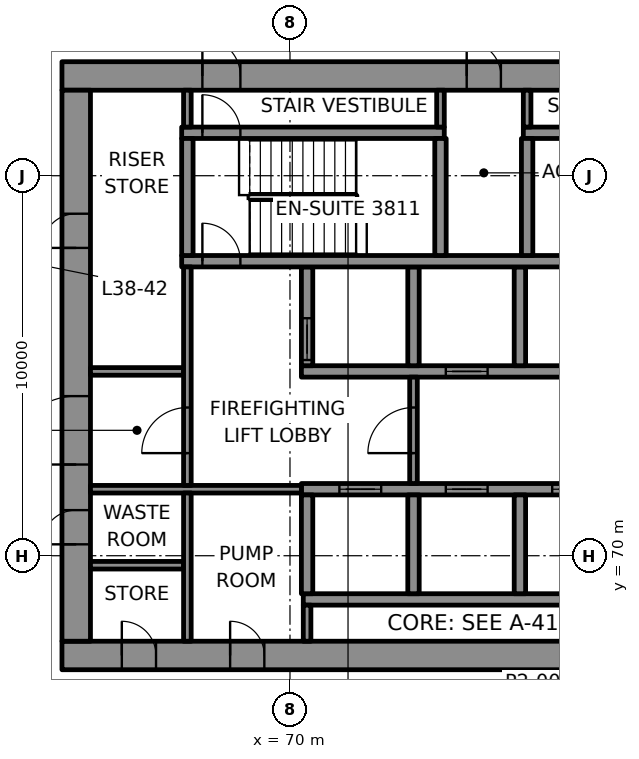
"""IFC4 building model, lengths in metres.
Left out: names, types, materials, properties, quantities, classifications, styles, units other than length and angle.
Written with IfcOpenShell. Run it as: python <this file> out.ifc"""

import sys

from ifc_helpers import new_model, si_unit, direction, frame, frame_2d, origin, place, context, subcontext, project, spatial, rectangle, extrude, element, fill, save


model = new_model("IFC4")
c1 = context("Model", 3, precision=1e-05, world=origin(), true_north=direction((0.0, 1.0)))
c2 = subcontext(c1, "Body", "Model", "MODEL_VIEW")
j1 = project(units=[si_unit("LENGTHUNIT", "METRE"), si_unit("PLANEANGLEUNIT", "RADIAN")], contexts=[c1])
p1 = place(None, origin())
s1 = spatial("IfcSite", under=j1, at=p1, CompositionType="ELEMENT")
p2 = place(p1, origin())
s2 = spatial("IfcBuilding", under=s1, at=p2, CompositionType="ELEMENT")
p3 = place(p2, frame((0.0, 0.0, 167.5)))
s3 = spatial("IfcBuildingStorey", under=s2, at=p3, CompositionType="ELEMENT", Elevation=167.5)
p4 = place(p3, frame((64.0, 67.375, 0.0), z_axis=(0.0, 0.0, 1.0), x_axis=(1.0, 0.0, 0.0)))
e1 = element("IfcWall", 1, at=p4, inside=s3, PredefinedType="SHEAR", context=c2, shape_type="SweptSolid", body=[
    extrude(rectangle(XDim=22.0, YDim=0.75, at=frame_2d((11.0, 0.0))), origin(), (0.0, 0.0, 1.0), 3.7),
])
p5 = place(p4, frame((1.575, 0.0, 0.0)))
e2 = element("IfcOpeningElement", 2, at=p5, cuts=e1, PredefinedType="OPENING", context=c2, shape_type="SweptSolid", body=[
    extrude(rectangle(XDim=0.9, YDim=2.1, at=frame_2d((0.45, 1.05))), frame((0.0, 0.385, 0.0), z_axis=(0.0, -1.0, 0.0), x_axis=(1.0, 0.0, 0.0)), (0.0, 0.0, 1.0), 0.77),
])
p6 = place(p4, frame((4.425, 0.0, 0.0)))
e3 = element("IfcOpeningElement", 3, at=p6, cuts=e1, PredefinedType="OPENING", context=c2, shape_type="SweptSolid", body=[
    extrude(rectangle(XDim=0.9, YDim=2.1, at=frame_2d((0.45, 1.05))), frame((0.0, 0.385, 0.0), z_axis=(0.0, -1.0, 0.0), x_axis=(1.0, 0.0, 0.0)), (0.0, 0.0, 1.0), 0.77),
])
p7 = place(p3, frame((64.0, 82.625, 0.0), z_axis=(0.0, 0.0, 1.0), x_axis=(1.0, 0.0, 0.0)))
e4 = element("IfcWall", 4, at=p7, inside=s3, PredefinedType="SHEAR", context=c2, shape_type="SweptSolid", body=[
    extrude(rectangle(XDim=22.0, YDim=0.75, at=frame_2d((11.0, 0.0))), origin(), (0.0, 0.0, 1.0), 3.7),
])
p8 = place(p7, frame((3.695, 0.0, 0.0)))
e5 = element("IfcOpeningElement", 5, at=p8, cuts=e4, PredefinedType="OPENING", context=c2, shape_type="SweptSolid", body=[
    extrude(rectangle(XDim=1.0, YDim=2.1, at=frame_2d((0.5, 1.05))), frame((0.0, 0.385, 0.0), z_axis=(0.0, -1.0, 0.0), x_axis=(1.0, 0.0, 0.0)), (0.0, 0.0, 1.0), 0.77),
])
p9 = place(p7, frame((17.505, 0.0, 0.0)))
e6 = element("IfcOpeningElement", 6, at=p9, cuts=e4, PredefinedType="OPENING", context=c2, shape_type="SweptSolid", body=[
    extrude(rectangle(XDim=1.0, YDim=2.1, at=frame_2d((0.5, 1.05))), frame((0.0, 0.385, 0.0), z_axis=(0.0, -1.0, 0.0), x_axis=(1.0, 0.0, 0.0)), (0.0, 0.0, 1.0), 0.77),
])
p10 = place(p7, frame((10.65, 0.0, 0.0)))
e7 = element("IfcOpeningElement", 7, at=p10, cuts=e4, PredefinedType="OPENING", context=c2, shape_type="SweptSolid", body=[
    extrude(rectangle(XDim=0.9, YDim=2.1, at=frame_2d((0.45, 1.05))), frame((0.0, 0.385, 0.0), z_axis=(0.0, -1.0, 0.0), x_axis=(1.0, 0.0, 0.0)), (0.0, 0.0, 1.0), 0.77),
])
p11 = place(p3, frame((64.375, 67.75, 0.0), z_axis=(0.0, 0.0, 1.0), x_axis=(0.0, 1.0, 0.0)))
e8 = element("IfcWall", 8, at=p11, inside=s3, PredefinedType="SHEAR", context=c2, shape_type="SweptSolid", body=[
    extrude(rectangle(XDim=14.5, YDim=0.75, at=frame_2d((7.25, 0.0))), origin(), (0.0, 0.0, 1.0), 3.7),
])
p12 = place(p11, frame((4.65, 0.0, 0.0)))
e9 = element("IfcOpeningElement", 9, at=p12, cuts=e8, PredefinedType="OPENING", context=c2, shape_type="SweptSolid", body=[
    extrude(rectangle(XDim=1.8, YDim=2.1, at=frame_2d((0.9, 1.05))), frame((0.0, 0.385, 0.0), z_axis=(0.0, -1.0, 0.0), x_axis=(1.0, 0.0, 0.0)), (0.0, 0.0, 1.0), 0.77),
])
p13 = place(p11, frame((2.55, 0.0, 0.0)))
e10 = element("IfcOpeningElement", 10, at=p13, cuts=e8, PredefinedType="OPENING", context=c2, shape_type="SweptSolid", body=[
    extrude(rectangle(XDim=0.9, YDim=2.1, at=frame_2d((0.45, 1.05))), frame((0.0, 0.385, 0.0), z_axis=(0.0, -1.0, 0.0), x_axis=(1.0, 0.0, 0.0)), (0.0, 0.0, 1.0), 0.77),
])
p14 = place(p11, frame((10.35, 0.0, 0.0)))
e11 = element("IfcOpeningElement", 11, at=p14, cuts=e8, PredefinedType="OPENING", context=c2, shape_type="SweptSolid", body=[
    extrude(rectangle(XDim=0.9, YDim=2.1, at=frame_2d((0.45, 1.05))), frame((0.0, 0.385, 0.0), z_axis=(0.0, -1.0, 0.0), x_axis=(1.0, 0.0, 0.0)), (0.0, 0.0, 1.0), 0.77),
])
p15 = place(p3, frame((70.35, 68.85, 0.0), z_axis=(0.0, 0.0, 1.0), x_axis=(1.0, 0.0, 0.0)))
e12 = element("IfcWall", 12, at=p15, inside=s3, PredefinedType="SHEAR", context=c2, shape_type="SweptSolid", body=[
    extrude(rectangle(XDim=14.2, YDim=0.3, at=frame_2d((7.1, 0.0))), origin(), (0.0, 0.0, 1.0), 3.7),
])
p16 = place(p3, frame((70.3, 71.75, 0.0), z_axis=(0.0, 0.0, 1.0), x_axis=(1.0, 0.0, 0.0)))
e13 = element("IfcWall", 13, at=p16, inside=s3, PredefinedType="SHEAR", context=c2, shape_type="SweptSolid", body=[
    extrude(rectangle(XDim=14.3, YDim=0.3, at=frame_2d((7.15, 0.0))), origin(), (0.0, 0.0, 1.0), 3.7),
])
p17 = place(p16, frame((1.0, 0.0, 0.0)))
e14 = element("IfcOpeningElement", 14, at=p17, cuts=e13, PredefinedType="OPENING", context=c2, shape_type="SweptSolid", body=[
    extrude(rectangle(XDim=1.1, YDim=2.1, at=frame_2d((0.55, 1.05))), frame((0.0, 0.16, 0.0), z_axis=(0.0, -1.0, 0.0), x_axis=(1.0, 0.0, 0.0)), (0.0, 0.0, 1.0), 0.32),
])
p18 = place(p16, frame((3.8, 0.0, 0.0)))
e15 = element("IfcOpeningElement", 15, at=p18, cuts=e13, PredefinedType="OPENING", context=c2, shape_type="SweptSolid", body=[
    extrude(rectangle(XDim=1.1, YDim=2.1, at=frame_2d((0.55, 1.05))), frame((0.0, 0.16, 0.0), z_axis=(0.0, -1.0, 0.0), x_axis=(1.0, 0.0, 0.0)), (0.0, 0.0, 1.0), 0.32),
])
p19 = place(p16, frame((6.6, 0.0, 0.0)))
e16 = element("IfcOpeningElement", 16, at=p19, cuts=e13, PredefinedType="OPENING", context=c2, shape_type="SweptSolid", body=[
    extrude(rectangle(XDim=1.1, YDim=2.1, at=frame_2d((0.55, 1.05))), frame((0.0, 0.16, 0.0), z_axis=(0.0, -1.0, 0.0), x_axis=(1.0, 0.0, 0.0)), (0.0, 0.0, 1.0), 0.32),
])
p20 = place(p16, frame((9.4, 0.0, 0.0)))
e17 = element("IfcOpeningElement", 17, at=p20, cuts=e13, PredefinedType="OPENING", context=c2, shape_type="SweptSolid", body=[
    extrude(rectangle(XDim=1.1, YDim=2.1, at=frame_2d((0.55, 1.05))), frame((0.0, 0.16, 0.0), z_axis=(0.0, -1.0, 0.0), x_axis=(1.0, 0.0, 0.0)), (0.0, 0.0, 1.0), 0.32),
])
p21 = place(p16, frame((12.2, 0.0, 0.0)))
e18 = element("IfcOpeningElement", 18, at=p21, cuts=e13, PredefinedType="OPENING", context=c2, shape_type="SweptSolid", body=[
    extrude(rectangle(XDim=1.1, YDim=2.1, at=frame_2d((0.55, 1.05))), frame((0.0, 0.16, 0.0), z_axis=(0.0, -1.0, 0.0), x_axis=(1.0, 0.0, 0.0)), (0.0, 0.0, 1.0), 0.32),
])
p22 = place(p3, frame((70.3, 74.85, 0.0), z_axis=(0.0, 0.0, 1.0), x_axis=(1.0, 0.0, 0.0)))
e19 = element("IfcWall", 19, at=p22, inside=s3, PredefinedType="SHEAR", context=c2, shape_type="SweptSolid", body=[
    extrude(rectangle(XDim=14.3, YDim=0.3, at=frame_2d((7.15, 0.0))), origin(), (0.0, 0.0, 1.0), 3.7),
])
p23 = place(p22, frame((3.8, 0.0, 0.0)))
e20 = element("IfcOpeningElement", 20, at=p23, cuts=e19, PredefinedType="OPENING", context=c2, shape_type="SweptSolid", body=[
    extrude(rectangle(XDim=1.1, YDim=2.1, at=frame_2d((0.55, 1.05))), frame((0.0, 0.16, 0.0), z_axis=(0.0, -1.0, 0.0), x_axis=(1.0, 0.0, 0.0)), (0.0, 0.0, 1.0), 0.32),
])
p24 = place(p22, frame((12.2, 0.0, 0.0)))
e21 = element("IfcOpeningElement", 21, at=p24, cuts=e19, PredefinedType="OPENING", context=c2, shape_type="SweptSolid", body=[
    extrude(rectangle(XDim=1.1, YDim=2.1, at=frame_2d((0.55, 1.05))), frame((0.0, 0.16, 0.0), z_axis=(0.0, -1.0, 0.0), x_axis=(1.0, 0.0, 0.0)), (0.0, 0.0, 1.0), 0.32),
])
p25 = place(p3, frame((70.45, 69.0, 0.0), z_axis=(0.0, 0.0, 1.0), x_axis=(0.0, 1.0, 0.0)))
e22 = element("IfcWall", 22, at=p25, inside=s3, PredefinedType="SHEAR", context=c2, shape_type="SweptSolid", body=[
    extrude(rectangle(XDim=2.6, YDim=0.3, at=frame_2d((1.3, 0.0))), origin(), (0.0, 0.0, 1.0), 3.7),
])
p26 = place(p3, frame((70.45, 75.0, 0.0), z_axis=(0.0, 0.0, 1.0), x_axis=(0.0, 1.0, 0.0)))
e23 = element("IfcWall", 23, at=p26, inside=s3, PredefinedType="SHEAR", context=c2, shape_type="SweptSolid", body=[
    extrude(rectangle(XDim=2.6, YDim=0.3, at=frame_2d((1.3, 0.0))), origin(), (0.0, 0.0, 1.0), 3.7),
])
p27 = place(p26, frame((0.15, 0.0, 0.0)))
e24 = element("IfcOpeningElement", 24, at=p27, cuts=e23, PredefinedType="OPENING", context=c2, shape_type="SweptSolid", body=[
    extrude(rectangle(XDim=1.1, YDim=2.1, at=frame_2d((0.55, 1.05))), frame((0.0, 0.16, 0.0), z_axis=(0.0, -1.0, 0.0), x_axis=(1.0, 0.0, 0.0)), (0.0, 0.0, 1.0), 0.32),
])
for number, where, z_axis, x_axis in (
    (25, (73.25, 69.0, 0.0), (0.0, 0.0, 1.0), (0.0, 1.0, 0.0)),
    (26, (73.25, 75.0, 0.0), (0.0, 0.0, 1.0), (0.0, 1.0, 0.0)),
    (27, (76.05, 69.0, 0.0), (0.0, 0.0, 1.0), (0.0, 1.0, 0.0)),
    (28, (76.05, 75.0, 0.0), (0.0, 0.0, 1.0), (0.0, 1.0, 0.0)),
):
    element("IfcWall", number, at=place(p3, frame(where, z_axis=z_axis, x_axis=x_axis)), inside=s3, PredefinedType="SHEAR", context=c2, shape_type="SweptSolid", body=[
        extrude(rectangle(XDim=2.6, YDim=0.3, at=frame_2d((1.3, 0.0))), origin(), (0.0, 0.0, 1.0), 3.7),
    ])
p28 = place(p3, frame((67.15, 77.75, 0.0), z_axis=(0.0, 0.0, 1.0), x_axis=(1.0, 0.0, 0.0)))
e29 = element("IfcWall", 29, at=p28, inside=s3, PredefinedType="SHEAR", context=c2, shape_type="SweptSolid", body=[
    extrude(rectangle(XDim=17.45, YDim=0.3, at=frame_2d((8.725, 0.0))), origin(), (0.0, 0.0, 1.0), 3.7),
])
p29 = place(p28, frame((0.545, 0.0, 0.0)))
e30 = element("IfcOpeningElement", 30, at=p29, cuts=e29, PredefinedType="OPENING", context=c2, shape_type="SweptSolid", body=[
    extrude(rectangle(XDim=1.0, YDim=2.1, at=frame_2d((0.5, 1.05))), frame((0.0, 0.16, 0.0), z_axis=(0.0, -1.0, 0.0), x_axis=(1.0, 0.0, 0.0)), (0.0, 0.0, 1.0), 0.32),
])
p30 = place(p3, frame((67.15, 81.13, 0.0), z_axis=(0.0, 0.0, 1.0), x_axis=(1.0, 0.0, 0.0)))
e31 = element("IfcWall", 31, at=p30, inside=s3, PredefinedType="SHEAR", context=c2, shape_type="SweptSolid", body=[
    extrude(rectangle(XDim=6.91, YDim=0.3, at=frame_2d((3.455, 0.0))), origin(), (0.0, 0.0, 1.0), 3.7),
])
p31 = place(p30, frame((0.545, 0.0, 0.0)))
e32 = element("IfcOpeningElement", 32, at=p31, cuts=e31, PredefinedType="OPENING", context=c2, shape_type="SweptSolid", body=[
    extrude(rectangle(XDim=1.0, YDim=2.1, at=frame_2d((0.5, 1.05))), frame((0.0, 0.16, 0.0), z_axis=(0.0, -1.0, 0.0), x_axis=(1.0, 0.0, 0.0)), (0.0, 0.0, 1.0), 0.32),
])
p32 = place(p3, frame((76.14, 81.13, 0.0), z_axis=(0.0, 0.0, 1.0), x_axis=(1.0, 0.0, 0.0)))
e33 = element("IfcWall", 33, at=p32, inside=s3, PredefinedType="SHEAR", context=c2, shape_type="SweptSolid", body=[
    extrude(rectangle(XDim=6.86, YDim=0.3, at=frame_2d((3.43, 0.0))), origin(), (0.0, 0.0, 1.0), 3.7),
])
p33 = place(p32, frame((5.365, 0.0, 0.0)))
e34 = element("IfcOpeningElement", 34, at=p33, cuts=e33, PredefinedType="OPENING", context=c2, shape_type="SweptSolid", body=[
    extrude(rectangle(XDim=1.0, YDim=2.1, at=frame_2d((0.5, 1.05))), frame((0.0, 0.16, 0.0), z_axis=(0.0, -1.0, 0.0), x_axis=(1.0, 0.0, 0.0)), (0.0, 0.0, 1.0), 0.32),
])
for number, where, z_axis, x_axis in (
    (35, (67.3, 77.9, 0.0), (0.0, 0.0, 1.0), (0.0, 1.0, 0.0)),
    (36, (73.96, 77.9, 0.0), (0.0, 0.0, 1.0), (0.0, 1.0, 0.0)),
    (37, (76.24, 77.9, 0.0), (0.0, 0.0, 1.0), (0.0, 1.0, 0.0)),
):
    element("IfcWall", number, at=place(p3, frame(where, z_axis=z_axis, x_axis=x_axis)), inside=s3, PredefinedType="SHEAR", context=c2, shape_type="SweptSolid", body=[
        extrude(rectangle(XDim=3.08, YDim=0.3, at=frame_2d((1.54, 0.0))), origin(), (0.0, 0.0, 1.0), 3.7),
    ])
p34 = place(p3, frame((64.75, 69.75, 0.0), z_axis=(0.0, 0.0, 1.0), x_axis=(1.0, 0.0, 0.0)))
e38 = element("IfcWall", 38, at=p34, inside=s3, PredefinedType="PARTITIONING", context=c2, shape_type="SweptSolid", body=[
    extrude(rectangle(XDim=2.45, YDim=0.2, at=frame_2d((1.225, 0.0))), origin(), (0.0, 0.0, 1.0), 3.7),
])
p35 = place(p3, frame((64.75, 71.75, 0.0), z_axis=(0.0, 0.0, 1.0), x_axis=(1.0, 0.0, 0.0)))
e39 = element("IfcWall", 39, at=p35, inside=s3, PredefinedType="PARTITIONING", context=c2, shape_type="SweptSolid", body=[
    extrude(rectangle(XDim=5.55, YDim=0.2, at=frame_2d((2.775, 0.0))), origin(), (0.0, 0.0, 1.0), 3.7),
])
p36 = place(p3, frame((64.75, 74.85, 0.0), z_axis=(0.0, 0.0, 1.0), x_axis=(1.0, 0.0, 0.0)))
e40 = element("IfcWall", 40, at=p36, inside=s3, PredefinedType="PARTITIONING", context=c2, shape_type="SweptSolid", body=[
    extrude(rectangle(XDim=2.45, YDim=0.2, at=frame_2d((1.225, 0.0))), origin(), (0.0, 0.0, 1.0), 3.7),
])
p37 = place(p3, frame((67.3, 67.75, 0.0), z_axis=(0.0, 0.0, 1.0), x_axis=(0.0, 1.0, 0.0)))
e41 = element("IfcWall", 41, at=p37, inside=s3, PredefinedType="PARTITIONING", context=c2, shape_type="SweptSolid", body=[
    extrude(rectangle(XDim=3.9, YDim=0.2, at=frame_2d((1.95, 0.0))), origin(), (0.0, 0.0, 1.0), 3.7),
])
p38 = place(p3, frame((67.3, 71.85, 0.0), z_axis=(0.0, 0.0, 1.0), x_axis=(0.0, 1.0, 0.0)))
e42 = element("IfcWall", 42, at=p38, inside=s3, PredefinedType="PARTITIONING", context=c2, shape_type="SweptSolid", body=[
    extrude(rectangle(XDim=5.75, YDim=0.2, at=frame_2d((2.875, 0.0))), origin(), (0.0, 0.0, 1.0), 3.7),
])
p39 = place(p38, frame((0.85, 0.0, 0.0)))
e43 = element("IfcOpeningElement", 43, at=p39, cuts=e42, PredefinedType="OPENING", context=c2, shape_type="SweptSolid", body=[
    extrude(rectangle(XDim=1.2, YDim=2.1, at=frame_2d((0.6, 1.05))), frame((0.0, 0.11, 0.0), z_axis=(0.0, -1.0, 0.0), x_axis=(1.0, 0.0, 0.0)), (0.0, 0.0, 1.0), 0.22),
])
p40 = place(p3, frame((67.3, 81.28, 0.0), z_axis=(0.0, 0.0, 1.0), x_axis=(0.0, 1.0, 0.0)))
e44 = element("IfcWall", 44, at=p40, inside=s3, PredefinedType="PARTITIONING", context=c2, shape_type="SweptSolid", body=[
    extrude(rectangle(XDim=0.97, YDim=0.2, at=frame_2d((0.485, 0.0))), origin(), (0.0, 0.0, 1.0), 3.7),
])
p41 = place(p3, frame((70.45, 67.75, 0.0), z_axis=(0.0, 0.0, 1.0), x_axis=(0.0, 1.0, 0.0)))
e45 = element("IfcWall", 45, at=p41, inside=s3, PredefinedType="PARTITIONING", context=c2, shape_type="SweptSolid", body=[
    extrude(rectangle(XDim=0.95, YDim=0.2, at=frame_2d((0.475, 0.0))), origin(), (0.0, 0.0, 1.0), 3.7),
])
p42 = place(p3, frame((73.25, 71.9, 0.0), z_axis=(0.0, 0.0, 1.0), x_axis=(0.0, 1.0, 0.0)))
e46 = element("IfcWall", 46, at=p42, inside=s3, PredefinedType="PARTITIONING", context=c2, shape_type="SweptSolid", body=[
    extrude(rectangle(XDim=2.8, YDim=0.2, at=frame_2d((1.4, 0.0))), origin(), (0.0, 0.0, 1.0), 3.7),
])
p43 = place(p42, frame((0.8, 0.0, 0.0)))
e47 = element("IfcOpeningElement", 47, at=p43, cuts=e46, PredefinedType="OPENING", context=c2, shape_type="SweptSolid", body=[
    extrude(rectangle(XDim=1.2, YDim=2.1, at=frame_2d((0.6, 1.05))), frame((0.0, 0.11, 0.0), z_axis=(0.0, -1.0, 0.0), x_axis=(1.0, 0.0, 0.0)), (0.0, 0.0, 1.0), 0.22),
])
for number, where, z_axis, x_axis in (
    (48, (73.96, 81.28, 0.0), (0.0, 0.0, 1.0), (0.0, 1.0, 0.0)),
    (49, (76.24, 81.28, 0.0), (0.0, 0.0, 1.0), (0.0, 1.0, 0.0)),
):
    element("IfcWall", number, at=place(p3, frame(where, z_axis=z_axis, x_axis=x_axis)), inside=s3, PredefinedType="PARTITIONING", context=c2, shape_type="SweptSolid", body=[
        extrude(rectangle(XDim=0.97, YDim=0.2, at=frame_2d((0.485, 0.0))), origin(), (0.0, 0.0, 1.0), 3.7),
    ])
p44 = place(p17, origin())
e50 = element("IfcDoor", 50, at=p44, inside=s3, OperationType="DOUBLE_DOOR_SLIDING", PredefinedType="DOOR", context=c2, shape_type="SweptSolid", body=[
    extrude(rectangle(XDim=1.1, YDim=2.1, at=frame_2d((0.55, 1.05))), frame((0.0, 0.025, 0.0), z_axis=(0.0, -1.0, 0.0), x_axis=(1.0, 0.0, 0.0)), (0.0, 0.0, 1.0), 0.05),
])
fill(e14, e50)
p45 = place(p18, origin())
e51 = element("IfcDoor", 51, at=p45, inside=s3, OperationType="DOUBLE_DOOR_SLIDING", PredefinedType="DOOR", context=c2, shape_type="SweptSolid", body=[
    extrude(rectangle(XDim=1.1, YDim=2.1, at=frame_2d((0.55, 1.05))), frame((0.0, 0.025, 0.0), z_axis=(0.0, -1.0, 0.0), x_axis=(1.0, 0.0, 0.0)), (0.0, 0.0, 1.0), 0.05),
])
fill(e15, e51)
p46 = place(p19, origin())
e52 = element("IfcDoor", 52, at=p46, inside=s3, OperationType="DOUBLE_DOOR_SLIDING", PredefinedType="DOOR", context=c2, shape_type="SweptSolid", body=[
    extrude(rectangle(XDim=1.1, YDim=2.1, at=frame_2d((0.55, 1.05))), frame((0.0, 0.025, 0.0), z_axis=(0.0, -1.0, 0.0), x_axis=(1.0, 0.0, 0.0)), (0.0, 0.0, 1.0), 0.05),
])
fill(e16, e52)
p47 = place(p27, origin())
e53 = element("IfcDoor", 53, at=p47, inside=s3, OperationType="DOUBLE_DOOR_SLIDING", PredefinedType="DOOR", context=c2, shape_type="SweptSolid", body=[
    extrude(rectangle(XDim=1.1, YDim=2.1, at=frame_2d((0.55, 1.05))), frame((0.0, 0.025, 0.0), z_axis=(0.0, -1.0, 0.0), x_axis=(1.0, 0.0, 0.0)), (0.0, 0.0, 1.0), 0.05),
])
fill(e24, e53)
p48 = place(p23, origin())
e54 = element("IfcDoor", 54, at=p48, inside=s3, OperationType="DOUBLE_DOOR_SLIDING", PredefinedType="DOOR", context=c2, shape_type="SweptSolid", body=[
    extrude(rectangle(XDim=1.1, YDim=2.1, at=frame_2d((0.55, 1.05))), frame((0.0, 0.025, 0.0), z_axis=(0.0, -1.0, 0.0), x_axis=(1.0, 0.0, 0.0)), (0.0, 0.0, 1.0), 0.05),
])
fill(e20, e54)
p49 = place(p29, origin())
e55 = element("IfcDoor", 55, at=p49, inside=s3, OperationType="SINGLE_SWING_LEFT", PredefinedType="DOOR", context=c2, shape_type="SweptSolid", body=[
    extrude(rectangle(XDim=1.0, YDim=2.1, at=frame_2d((0.5, 1.05))), frame((0.0, 0.025, 0.0), z_axis=(0.0, -1.0, 0.0), x_axis=(1.0, 0.0, 0.0)), (0.0, 0.0, 1.0), 0.05),
])
fill(e30, e55)
p50 = place(p31, origin())
e56 = element("IfcDoor", 56, at=p50, inside=s3, OperationType="SINGLE_SWING_RIGHT", PredefinedType="DOOR", context=c2, shape_type="SweptSolid", body=[
    extrude(rectangle(XDim=1.0, YDim=2.1, at=frame_2d((0.5, 1.05))), frame((0.0, 0.025, 0.0), z_axis=(0.0, -1.0, 0.0), x_axis=(1.0, 0.0, 0.0)), (0.0, 0.0, 1.0), 0.05),
])
fill(e32, e56)
p51 = place(p8, origin())
e57 = element("IfcDoor", 57, at=p51, inside=s3, OperationType="SINGLE_SWING_LEFT", PredefinedType="DOOR", context=c2, shape_type="SweptSolid", body=[
    extrude(rectangle(XDim=1.0, YDim=2.1, at=frame_2d((0.5, 1.05))), frame((0.0, 0.095, 0.0), z_axis=(0.0, -1.0, 0.0), x_axis=(1.0, 0.0, 0.0)), (0.0, 0.0, 1.0), 0.19),
])
fill(e5, e57)
p52 = place(p43, origin())
e58 = element("IfcDoor", 58, at=p52, inside=s3, OperationType="SINGLE_SWING_LEFT", PredefinedType="DOOR", context=c2, shape_type="SweptSolid", body=[
    extrude(rectangle(XDim=1.2, YDim=2.1, at=frame_2d((0.6, 1.05))), frame((0.0, 0.025, 0.0), z_axis=(0.0, -1.0, 0.0), x_axis=(1.0, 0.0, 0.0)), (0.0, 0.0, 1.0), 0.05),
])
fill(e47, e58)
p53 = place(p39, origin())
e59 = element("IfcDoor", 59, at=p53, inside=s3, OperationType="SINGLE_SWING_RIGHT", PredefinedType="DOOR", context=c2, shape_type="SweptSolid", body=[
    extrude(rectangle(XDim=1.2, YDim=2.1, at=frame_2d((0.6, 1.05))), frame((0.0, 0.025, 0.0), z_axis=(0.0, -1.0, 0.0), x_axis=(1.0, 0.0, 0.0)), (0.0, 0.0, 1.0), 0.05),
])
fill(e43, e59)
p54 = place(p12, origin())
e60 = element("IfcDoor", 60, at=p54, inside=s3, OperationType="SINGLE_SWING_LEFT", PredefinedType="DOOR", context=c2, shape_type="SweptSolid", body=[
    extrude(rectangle(XDim=1.8, YDim=2.1, at=frame_2d((0.9, 1.05))), frame((0.0, 0.095, 0.0), z_axis=(0.0, -1.0, 0.0), x_axis=(1.0, 0.0, 0.0)), (0.0, 0.0, 1.0), 0.19),
])
fill(e9, e60)
p55 = place(p5, origin())
e61 = element("IfcDoor", 61, at=p55, inside=s3, OperationType="SINGLE_SWING_LEFT", PredefinedType="DOOR", context=c2, shape_type="SweptSolid", body=[
    extrude(rectangle(XDim=0.9, YDim=2.1, at=frame_2d((0.45, 1.05))), frame((0.0, 0.095, 0.0), z_axis=(0.0, -1.0, 0.0), x_axis=(1.0, 0.0, 0.0)), (0.0, 0.0, 1.0), 0.19),
])
fill(e2, e61)
p56 = place(p13, origin())
e62 = element("IfcDoor", 62, at=p56, inside=s3, OperationType="SINGLE_SWING_RIGHT", PredefinedType="DOOR", context=c2, shape_type="SweptSolid", body=[
    extrude(rectangle(XDim=0.9, YDim=2.1, at=frame_2d((0.45, 1.05))), frame((0.0, 0.095, 0.0), z_axis=(0.0, -1.0, 0.0), x_axis=(1.0, 0.0, 0.0)), (0.0, 0.0, 1.0), 0.19),
])
fill(e10, e62)
p57 = place(p6, origin())
e63 = element("IfcDoor", 63, at=p57, inside=s3, OperationType="SINGLE_SWING_LEFT", PredefinedType="DOOR", context=c2, shape_type="SweptSolid", body=[
    extrude(rectangle(XDim=0.9, YDim=2.1, at=frame_2d((0.45, 1.05))), frame((0.0, 0.095, 0.0), z_axis=(0.0, -1.0, 0.0), x_axis=(1.0, 0.0, 0.0)), (0.0, 0.0, 1.0), 0.19),
])
fill(e3, e63)
p58 = place(p14, origin())
e64 = element("IfcDoor", 64, at=p58, inside=s3, OperationType="SINGLE_SWING_RIGHT", PredefinedType="DOOR", context=c2, shape_type="SweptSolid", body=[
    extrude(rectangle(XDim=0.9, YDim=2.1, at=frame_2d((0.45, 1.05))), frame((0.0, 0.095, 0.0), z_axis=(0.0, -1.0, 0.0), x_axis=(1.0, 0.0, 0.0)), (0.0, 0.0, 1.0), 0.19),
])
fill(e11, e64)
p59 = place(p10, origin())
e65 = element("IfcDoor", 65, at=p59, inside=s3, OperationType="SINGLE_SWING_LEFT", PredefinedType="DOOR", context=c2, shape_type="SweptSolid", body=[
    extrude(rectangle(XDim=0.9, YDim=2.1, at=frame_2d((0.45, 1.05))), frame((0.0, 0.095, 0.0), z_axis=(0.0, -1.0, 0.0), x_axis=(1.0, 0.0, 0.0)), (0.0, 0.0, 1.0), 0.19),
])
fill(e7, e65)
save(model, sys.argv[1])
